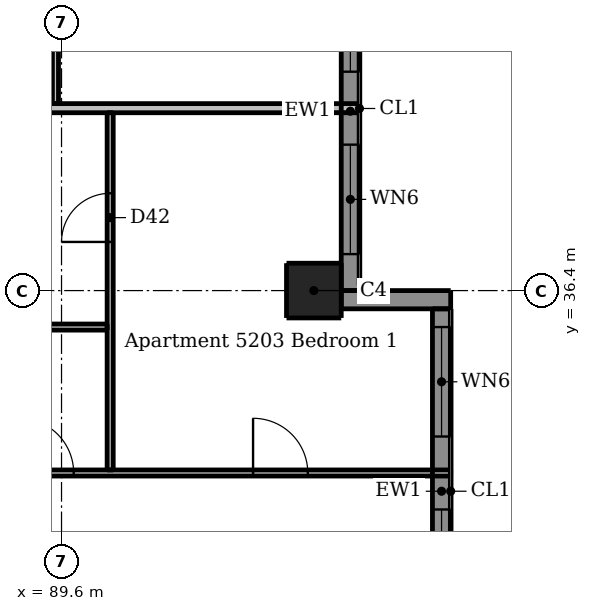
"""IFC4 building model, lengths in metres.
Left out: names, types, materials, properties, quantities, classifications, styles, units other than length and angle.
Written with IfcOpenShell. Run it as: python <this file> out.ifc"""

import sys

from ifc_helpers import new_model, si_unit, direction, frame, frame_2d, origin, origin_2d, place, context, subcontext, project, spatial, rectangle, extrude, element, fill, save


model = new_model("IFC4")
c1 = context("Model", 3, precision=1e-05, world=origin(), true_north=direction((0.0, 1.0)))
c2 = subcontext(c1, "Body", "Model", "MODEL_VIEW")
j1 = project(units=[si_unit("LENGTHUNIT", "METRE"), si_unit("PLANEANGLEUNIT", "RADIAN")], contexts=[c1])
p1 = place(None, origin())
s1 = spatial("IfcSite", under=j1, at=p1, CompositionType="ELEMENT")
p2 = place(p1, origin())
s2 = spatial("IfcBuilding", under=s1, at=p2, CompositionType="ELEMENT")
p3 = place(p2, frame((0.0, 0.0, 196.9)))
s3 = spatial("IfcBuildingStorey", under=s2, at=p3, CompositionType="ELEMENT", Elevation=196.9)
p4 = place(p3, frame((93.75, 36.4, 0.0), z_axis=(0.0, 0.0, 1.0), x_axis=(1.0, 0.0, 0.0)))
e1 = element("IfcColumn", 1, at=p4, inside=s3, PredefinedType="COLUMN", context=c2, shape_type="SweptSolid", body=[
    extrude(rectangle(XDim=0.9, YDim=0.9, at=origin_2d()), origin(), (0.0, 0.0, 1.0), 3.05),
])
p5 = place(p3, frame((96.0, 36.25, 0.0), z_axis=(0.0, 0.0, 1.0), x_axis=(-1.0, 0.0, 0.0)))
e2 = element("IfcWall", 2, at=p5, inside=s3, PredefinedType="SOLIDWALL", context=c2, shape_type="SweptSolid", body=[
    extrude(rectangle(XDim=1.8, YDim=0.3, at=frame_2d((0.9, 0.0))), origin(), (0.0, 0.0, 1.0), 3.05),
])
p6 = place(p3, frame((95.85, 30.1, 0.0), z_axis=(0.0, 0.0, 1.0), x_axis=(0.0, 1.0, 0.0)))
e3 = element("IfcWall", 3, at=p6, inside=s3, PredefinedType="SOLIDWALL", context=c2, shape_type="SweptSolid", body=[
    extrude(rectangle(XDim=6.0, YDim=0.3, at=frame_2d((3.0, 0.0))), origin(), (0.0, 0.0, 1.0), 3.05),
])
p7 = place(p6, frame((0.9, 0.0, 0.15)))
e4 = element("IfcOpeningElement", 4, at=p7, cuts=e3, PredefinedType="OPENING", context=c2, shape_type="SweptSolid", body=[
    extrude(rectangle(XDim=1.8, YDim=2.1, at=frame_2d((0.9, 1.05))), frame((0.0, 0.16, 0.0), z_axis=(0.0, -1.0, 0.0), x_axis=(1.0, 0.0, 0.0)), (0.0, 0.0, 1.0), 0.32),
])
p8 = place(p6, frame((3.9, 0.0, 0.15)))
e5 = element("IfcOpeningElement", 5, at=p8, cuts=e3, PredefinedType="OPENING", context=c2, shape_type="SweptSolid", body=[
    extrude(rectangle(XDim=1.8, YDim=2.1, at=frame_2d((0.9, 1.05))), frame((0.0, 0.16, 0.0), z_axis=(0.0, -1.0, 0.0), x_axis=(1.0, 0.0, 0.0)), (0.0, 0.0, 1.0), 0.32),
])
p9 = place(p3, frame((94.35, 36.4, 0.0), z_axis=(0.0, 0.0, 1.0), x_axis=(0.0, 1.0, 0.0)))
e6 = element("IfcWall", 6, at=p9, inside=s3, PredefinedType="SOLIDWALL", context=c2, shape_type="SweptSolid", body=[
    extrude(rectangle(XDim=5.9, YDim=0.3, at=frame_2d((2.95, 0.0))), origin(), (0.0, 0.0, 1.0), 3.05),
])
p10 = place(p9, frame((0.6, 0.0, 0.15)))
e7 = element("IfcOpeningElement", 7, at=p10, cuts=e6, PredefinedType="OPENING", context=c2, shape_type="SweptSolid", body=[
    extrude(rectangle(XDim=1.8, YDim=2.1, at=frame_2d((0.9, 1.05))), frame((0.0, 0.16, 0.0), z_axis=(0.0, -1.0, 0.0), x_axis=(1.0, 0.0, 0.0)), (0.0, 0.0, 1.0), 0.32),
])
p11 = place(p9, frame((3.6, 0.0, 0.15)))
e8 = element("IfcOpeningElement", 8, at=p11, cuts=e6, PredefinedType="OPENING", context=c2, shape_type="SweptSolid", body=[
    extrude(rectangle(XDim=1.8, YDim=2.1, at=frame_2d((0.9, 1.05))), frame((0.0, 0.16, 0.0), z_axis=(0.0, -1.0, 0.0), x_axis=(1.0, 0.0, 0.0)), (0.0, 0.0, 1.0), 0.32),
])
p12 = place(p3, frame((89.5, 60.325, 0.0), z_axis=(0.0, 0.0, 1.0), x_axis=(0.0, -1.0, 0.0)))
e9 = element("IfcWall", 9, at=p12, inside=s3, PredefinedType="PARTITIONING", context=c2, shape_type="SweptSolid", body=[
    extrude(rectangle(XDim=20.85, YDim=0.1, at=frame_2d((10.425, 0.0))), origin(), (0.0, 0.0, 1.0), 2.51),
])
p13 = place(p12, frame((10.575, 0.0, 0.0)))
e10 = element("IfcOpeningElement", 10, at=p13, cuts=e9, PredefinedType="OPENING", context=c2, shape_type="SweptSolid", body=[
    extrude(rectangle(XDim=0.9, YDim=2.1, at=frame_2d((0.45, 1.05))), frame((0.0, 0.06, 0.0), z_axis=(0.0, -1.0, 0.0), x_axis=(1.0, 0.0, 0.0)), (0.0, 0.0, 1.0), 0.12),
])
p14 = place(p12, frame((6.675, 0.0, 0.0)))
e11 = element("IfcOpeningElement", 11, at=p14, cuts=e9, PredefinedType="OPENING", context=c2, shape_type="SweptSolid", body=[
    extrude(rectangle(XDim=0.9, YDim=2.1, at=frame_2d((0.45, 1.05))), frame((0.0, 0.06, 0.0), z_axis=(0.0, -1.0, 0.0), x_axis=(1.0, 0.0, 0.0)), (0.0, 0.0, 1.0), 0.12),
])
p15 = place(p12, frame((8.775, 0.0, 0.0)))
e12 = element("IfcOpeningElement", 12, at=p15, cuts=e9, PredefinedType="OPENING", context=c2, shape_type="SweptSolid", body=[
    extrude(rectangle(XDim=0.9, YDim=2.1, at=frame_2d((0.45, 1.05))), frame((0.0, 0.06, 0.0), z_axis=(0.0, -1.0, 0.0), x_axis=(1.0, 0.0, 0.0)), (0.0, 0.0, 1.0), 0.12),
])
p16 = place(p12, frame((19.075, 0.0, 0.0)))
e13 = element("IfcOpeningElement", 13, at=p16, cuts=e9, PredefinedType="OPENING", context=c2, shape_type="SweptSolid", body=[
    extrude(rectangle(XDim=0.9, YDim=2.1, at=frame_2d((0.45, 1.05))), frame((0.0, 0.06, 0.0), z_axis=(0.0, -1.0, 0.0), x_axis=(1.0, 0.0, 0.0)), (0.0, 0.0, 1.0), 0.12),
])
p17 = place(p12, frame((15.775, 0.0, 0.0)))
e14 = element("IfcOpeningElement", 14, at=p17, cuts=e9, PredefinedType="OPENING", context=c2, shape_type="SweptSolid", body=[
    extrude(rectangle(XDim=0.9, YDim=2.1, at=frame_2d((0.45, 1.05))), frame((0.0, 0.06, 0.0), z_axis=(0.0, -1.0, 0.0), x_axis=(1.0, 0.0, 0.0)), (0.0, 0.0, 1.0), 0.12),
])
p18 = place(p12, frame((1.275, 0.0, 0.0)))
e15 = element("IfcOpeningElement", 15, at=p18, cuts=e9, PredefinedType="OPENING", context=c2, shape_type="SweptSolid", body=[
    extrude(rectangle(XDim=0.9, YDim=2.1, at=frame_2d((0.45, 1.05))), frame((0.0, 0.06, 0.0), z_axis=(0.0, -1.0, 0.0), x_axis=(1.0, 0.0, 0.0)), (0.0, 0.0, 1.0), 0.12),
])
p19 = place(p12, frame((12.725, 0.0, 0.0)))
e16 = element("IfcOpeningElement", 16, at=p19, cuts=e9, PredefinedType="OPENING", context=c2, shape_type="SweptSolid", body=[
    extrude(rectangle(XDim=0.8, YDim=2.1, at=frame_2d((0.4, 1.05))), frame((0.0, 0.06, 0.0), z_axis=(0.0, -1.0, 0.0), x_axis=(1.0, 0.0, 0.0)), (0.0, 0.0, 1.0), 0.12),
])
p20 = place(p12, frame((4.325, 0.0, 0.0)))
e17 = element("IfcOpeningElement", 17, at=p20, cuts=e9, PredefinedType="OPENING", context=c2, shape_type="SweptSolid", body=[
    extrude(rectangle(XDim=0.8, YDim=2.1, at=frame_2d((0.4, 1.05))), frame((0.0, 0.06, 0.0), z_axis=(0.0, -1.0, 0.0), x_axis=(1.0, 0.0, 0.0)), (0.0, 0.0, 1.0), 0.12),
])
p21 = place(p3, frame((90.4, 33.45, 0.0), z_axis=(0.0, 0.0, 1.0), x_axis=(0.0, 1.0, 0.0)))
e18 = element("IfcWall", 18, at=p21, inside=s3, PredefinedType="PARTITIONING", context=c2, shape_type="SweptSolid", body=[
    extrude(rectangle(XDim=5.875, YDim=0.1, at=frame_2d((2.938, 0.0))), origin(), (0.0, 0.0, 1.0), 3.05),
])
p22 = place(p21, frame((3.75, 0.0, 0.0)))
e19 = element("IfcOpeningElement", 19, at=p22, cuts=e18, PredefinedType="OPENING", context=c2, shape_type="SweptSolid", body=[
    extrude(rectangle(XDim=0.8, YDim=2.1, at=frame_2d((0.4, 1.05))), frame((0.0, 0.06, 0.0), z_axis=(0.0, -1.0, 0.0), x_axis=(1.0, 0.0, 0.0)), (0.0, 0.0, 1.0), 0.12),
])
p23 = place(p3, frame((88.375, 35.8, 0.0), z_axis=(0.0, 0.0, 1.0), x_axis=(1.0, 0.0, 0.0)))
e20 = element("IfcWall", 20, at=p23, inside=s3, PredefinedType="PARTITIONING", context=c2, shape_type="SweptSolid", body=[
    extrude(rectangle(XDim=1.975, YDim=0.1, at=frame_2d((0.988, 0.0))), origin(), (0.0, 0.0, 1.0), 3.05),
])
p24 = place(p3, frame((88.375, 33.4, 0.0), z_axis=(0.0, 0.0, 1.0), x_axis=(1.0, 0.0, 0.0)))
e21 = element("IfcWall", 21, at=p24, inside=s3, PredefinedType="PARTITIONING", context=c2, shape_type="SweptSolid", body=[
    extrude(rectangle(XDim=7.625, YDim=0.1, at=frame_2d((3.812, 0.0))), origin(), (0.0, 0.0, 1.0), 3.05),
])
p25 = place(p24, frame((0.525, 0.0, 0.0)))
e22 = element("IfcOpeningElement", 22, at=p25, cuts=e21, PredefinedType="OPENING", context=c2, shape_type="SweptSolid", body=[
    extrude(rectangle(XDim=0.9, YDim=2.1, at=frame_2d((0.45, 1.05))), frame((0.0, 0.06, 0.0), z_axis=(0.0, -1.0, 0.0), x_axis=(1.0, 0.0, 0.0)), (0.0, 0.0, 1.0), 0.12),
])
p26 = place(p24, frame((4.375, 0.0, 0.0)))
e23 = element("IfcOpeningElement", 23, at=p26, cuts=e21, PredefinedType="OPENING", context=c2, shape_type="SweptSolid", body=[
    extrude(rectangle(XDim=0.9, YDim=2.1, at=frame_2d((0.45, 1.05))), frame((0.0, 0.06, 0.0), z_axis=(0.0, -1.0, 0.0), x_axis=(1.0, 0.0, 0.0)), (0.0, 0.0, 1.0), 0.12),
])
p27 = place(p3, frame((88.375, 39.4, 0.0), z_axis=(0.0, 0.0, 1.0), x_axis=(1.0, 0.0, 0.0)))
e24 = element("IfcWall", 24, at=p27, inside=s3, PredefinedType="PARTITIONING", context=c2, shape_type="SweptSolid", body=[
    extrude(rectangle(XDim=6.125, YDim=0.15, at=frame_2d((3.062, 0.0))), origin(), (0.0, 0.0, 1.0), 3.05),
])
p28 = place(p7, origin())
e25 = element("IfcWindow", 25, at=p28, inside=s3, PartitioningType="DOUBLE_PANEL_VERTICAL", PredefinedType="WINDOW", context=c2, shape_type="SweptSolid", body=[
    extrude(rectangle(XDim=1.8, YDim=2.1, at=frame_2d((0.9, 1.05))), frame((0.0, 0.03, 0.0), z_axis=(0.0, -1.0, 0.0), x_axis=(1.0, 0.0, 0.0)), (0.0, 0.0, 1.0), 0.06),
])
fill(e4, e25)
p29 = place(p8, origin())
e26 = element("IfcWindow", 26, at=p29, inside=s3, PartitioningType="DOUBLE_PANEL_VERTICAL", PredefinedType="WINDOW", context=c2, shape_type="SweptSolid", body=[
    extrude(rectangle(XDim=1.8, YDim=2.1, at=frame_2d((0.9, 1.05))), frame((0.0, 0.03, 0.0), z_axis=(0.0, -1.0, 0.0), x_axis=(1.0, 0.0, 0.0)), (0.0, 0.0, 1.0), 0.06),
])
fill(e5, e26)
p30 = place(p10, origin())
e27 = element("IfcWindow", 27, at=p30, inside=s3, PartitioningType="DOUBLE_PANEL_VERTICAL", PredefinedType="WINDOW", context=c2, shape_type="SweptSolid", body=[
    extrude(rectangle(XDim=1.8, YDim=2.1, at=frame_2d((0.9, 1.05))), frame((0.0, 0.03, 0.0), z_axis=(0.0, -1.0, 0.0), x_axis=(1.0, 0.0, 0.0)), (0.0, 0.0, 1.0), 0.06),
])
fill(e7, e27)
p31 = place(p11, origin())
e28 = element("IfcWindow", 28, at=p31, inside=s3, PartitioningType="DOUBLE_PANEL_VERTICAL", PredefinedType="WINDOW", context=c2, shape_type="SweptSolid", body=[
    extrude(rectangle(XDim=1.8, YDim=2.1, at=frame_2d((0.9, 1.05))), frame((0.0, 0.03, 0.0), z_axis=(0.0, -1.0, 0.0), x_axis=(1.0, 0.0, 0.0)), (0.0, 0.0, 1.0), 0.06),
])
fill(e8, e28)
p32 = place(p25, origin())
e29 = element("IfcDoor", 29, at=p32, inside=s3, OperationType="SINGLE_SWING_LEFT", PredefinedType="DOOR", context=c2, shape_type="SweptSolid", body=[
    extrude(rectangle(XDim=0.9, YDim=2.1, at=frame_2d((0.45, 1.05))), frame((0.0, 0.025, 0.0), z_axis=(0.0, -1.0, 0.0), x_axis=(1.0, 0.0, 0.0)), (0.0, 0.0, 1.0), 0.05),
])
fill(e22, e29)
p33 = place(p26, origin())
e30 = element("IfcDoor", 30, at=p33, inside=s3, OperationType="SINGLE_SWING_LEFT", PredefinedType="DOOR", context=c2, shape_type="SweptSolid", body=[
    extrude(rectangle(XDim=0.9, YDim=2.1, at=frame_2d((0.45, 1.05))), frame((0.0, 0.025, 0.0), z_axis=(0.0, -1.0, 0.0), x_axis=(1.0, 0.0, 0.0)), (0.0, 0.0, 1.0), 0.05),
])
fill(e23, e30)
p34 = place(p22, origin())
e31 = element("IfcDoor", 31, at=p34, inside=s3, OperationType="SINGLE_SWING_LEFT", PredefinedType="DOOR", context=c2, shape_type="SweptSolid", body=[
    extrude(rectangle(XDim=0.8, YDim=2.1, at=frame_2d((0.4, 1.05))), frame((0.0, 0.025, 0.0), z_axis=(0.0, -1.0, 0.0), x_axis=(1.0, 0.0, 0.0)), (0.0, 0.0, 1.0), 0.05),
])
fill(e19, e31)
save(model, sys.argv[1])
